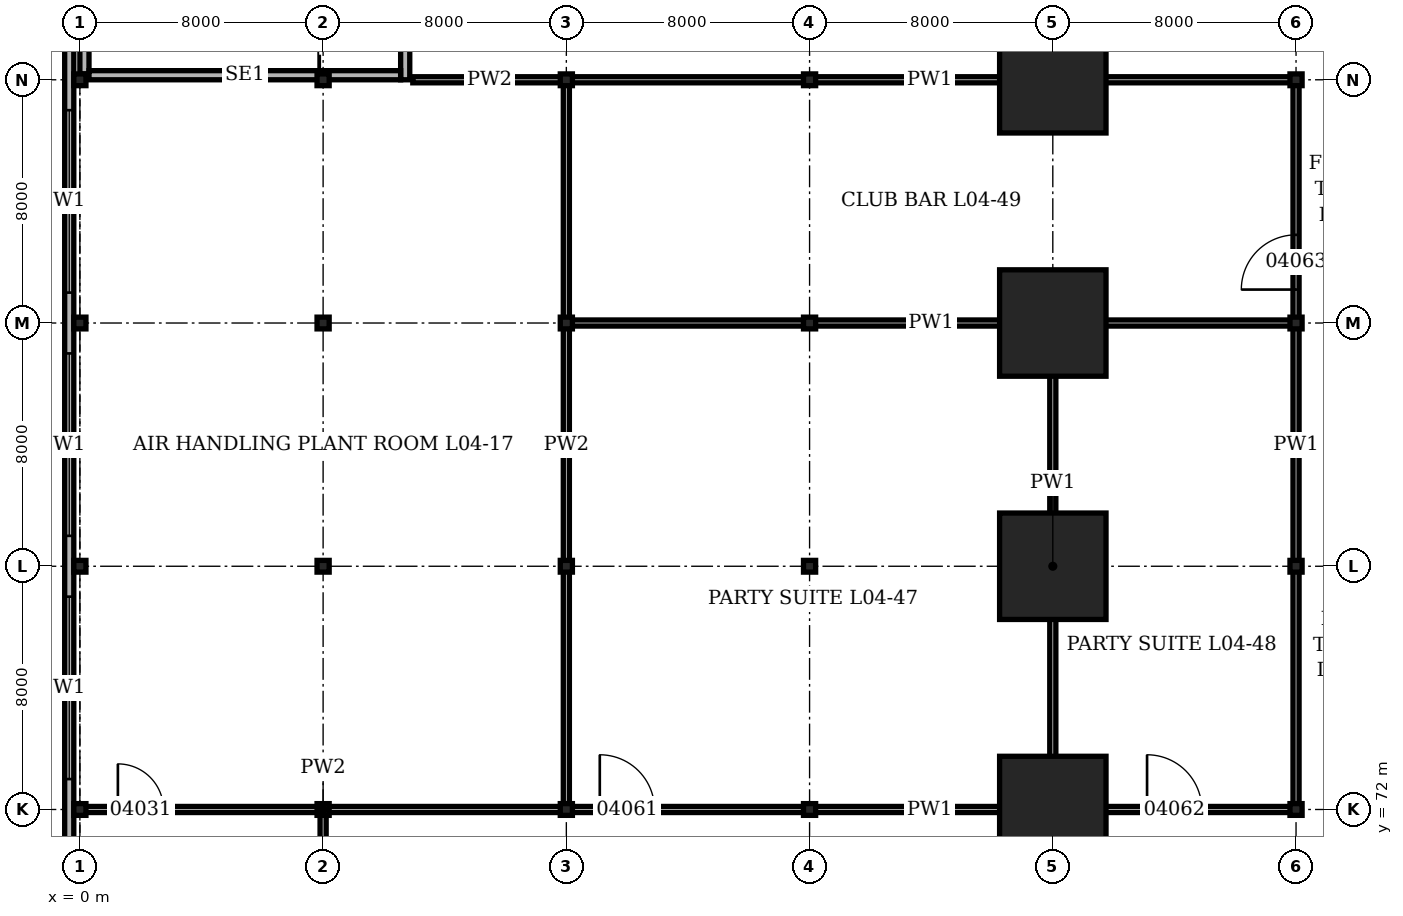
"""IFC4 building model, lengths in metres.
Left out: names, types, materials, properties, quantities, classifications, styles, units other than length and angle.
Written with IfcOpenShell. Run it as: python <this file> out.ifc"""

import sys

from ifc_helpers import new_model, si_unit, direction, frame, frame_2d, origin, origin_2d, place, context, subcontext, project, spatial, rectangle, hollow_rectangle, i_section, extrude, element, fill, save


model = new_model("IFC4")
c1 = context("Model", 3, precision=1e-05, world=origin(), true_north=direction((0.0, 1.0)))
c2 = subcontext(c1, "Body", "Model", "MODEL_VIEW")
j1 = project(units=[si_unit("LENGTHUNIT", "METRE"), si_unit("PLANEANGLEUNIT", "RADIAN")], contexts=[c1])
p1 = place(None, origin())
s1 = spatial("IfcSite", under=j1, at=p1, CompositionType="ELEMENT")
p2 = place(p1, origin())
s2 = spatial("IfcBuilding", under=s1, at=p2, CompositionType="ELEMENT")
p3 = place(p2, frame((0.0, 0.0, 19.9)))
s3 = spatial("IfcBuildingStorey", under=s2, at=p3, CompositionType="ELEMENT", Elevation=19.9)
for number, where, z_axis, x_axis in (
    (1, (0.0, 72.0, 0.0), (0.0, 0.0, 1.0), (1.0, 0.0, 0.0)),
    (2, (0.0, 80.0, 0.0), (0.0, 0.0, 1.0), (1.0, 0.0, 0.0)),
    (3, (0.0, 88.0, 0.0), (0.0, 0.0, 1.0), (1.0, 0.0, 0.0)),
    (4, (0.0, 96.0, 0.0), (0.0, 0.0, 1.0), (1.0, 0.0, 0.0)),
    (5, (8.0, 72.0, 0.0), (0.0, 0.0, 1.0), (1.0, 0.0, 0.0)),
    (6, (8.0, 80.0, 0.0), (0.0, 0.0, 1.0), (1.0, 0.0, 0.0)),
    (7, (8.0, 88.0, 0.0), (0.0, 0.0, 1.0), (1.0, 0.0, 0.0)),
    (8, (8.0, 96.0, 0.0), (0.0, 0.0, 1.0), (1.0, 0.0, 0.0)),
    (9, (16.0, 72.0, 0.0), (0.0, 0.0, 1.0), (1.0, 0.0, 0.0)),
    (10, (16.0, 80.0, 0.0), (0.0, 0.0, 1.0), (1.0, 0.0, 0.0)),
    (11, (16.0, 88.0, 0.0), (0.0, 0.0, 1.0), (1.0, 0.0, 0.0)),
    (12, (16.0, 96.0, 0.0), (0.0, 0.0, 1.0), (1.0, 0.0, 0.0)),
    (13, (24.0, 72.0, 0.0), (0.0, 0.0, 1.0), (1.0, 0.0, 0.0)),
    (14, (24.0, 80.0, 0.0), (0.0, 0.0, 1.0), (1.0, 0.0, 0.0)),
    (15, (24.0, 88.0, 0.0), (0.0, 0.0, 1.0), (1.0, 0.0, 0.0)),
    (16, (24.0, 96.0, 0.0), (0.0, 0.0, 1.0), (1.0, 0.0, 0.0)),
):
    element("IfcColumn", number, at=place(p3, frame(where, z_axis=z_axis, x_axis=x_axis)), inside=s3, PredefinedType="COLUMN", context=c2, shape_type="SweptSolid", body=[
        extrude(i_section(OverallWidth=0.399, OverallDepth=0.386, WebThickness=0.021, FlangeThickness=0.033, at=origin_2d()), origin(), (0.0, 0.0, 1.0), 6.0),
    ])
for number, where, z_axis, x_axis in (
    (17, (32.0, 72.0, 0.0), (0.0, 0.0, 1.0), (1.0, 0.0, 0.0)),
    (18, (32.0, 80.0, 0.0), (0.0, 0.0, 1.0), (1.0, 0.0, 0.0)),
    (19, (32.0, 88.0, 0.0), (0.0, 0.0, 1.0), (1.0, 0.0, 0.0)),
    (20, (32.0, 96.0, 0.0), (0.0, 0.0, 1.0), (1.0, 0.0, 0.0)),
):
    element("IfcColumn", number, at=place(p3, frame(where, z_axis=z_axis, x_axis=x_axis)), inside=s3, PredefinedType="COLUMN", context=c2, shape_type="SweptSolid", body=[
        extrude(hollow_rectangle(XDim=3.5, YDim=3.5, WallThickness=0.5, at=origin_2d()), origin(), (0.0, 0.0, 1.0), 6.0),
    ])
for number, where, z_axis, x_axis in (
    (21, (40.0, 72.0, 0.0), (0.0, 0.0, 1.0), (1.0, 0.0, 0.0)),
    (22, (40.0, 80.0, 0.0), (0.0, 0.0, 1.0), (1.0, 0.0, 0.0)),
    (23, (40.0, 88.0, 0.0), (0.0, 0.0, 1.0), (1.0, 0.0, 0.0)),
    (24, (40.0, 96.0, 0.0), (0.0, 0.0, 1.0), (1.0, 0.0, 0.0)),
):
    element("IfcColumn", number, at=place(p3, frame(where, z_axis=z_axis, x_axis=x_axis)), inside=s3, PredefinedType="COLUMN", context=c2, shape_type="SweptSolid", body=[
        extrude(i_section(OverallWidth=0.399, OverallDepth=0.386, WebThickness=0.021, FlangeThickness=0.033, at=origin_2d()), origin(), (0.0, 0.0, 1.0), 6.0),
    ])
p4 = place(p3, frame((-0.35, 112.35, 0.0), z_axis=(0.0, 0.0, 1.0), x_axis=(0.0, -1.0, 0.0)))
e25 = element("IfcWall", 25, at=p4, inside=s3, PredefinedType="SOLIDWALL", context=c2, shape_type="SweptSolid", body=[
    extrude(rectangle(XDim=112.7, YDim=0.3, at=frame_2d((56.35, 0.0))), origin(), (0.0, 0.0, 1.0), 6.0),
])
p5 = place(p4, frame((1.35, 0.0, 1.0)))
e26 = element("IfcOpeningElement", 26, at=p5, cuts=e25, PredefinedType="OPENING", context=c2, shape_type="SweptSolid", body=[
    extrude(rectangle(XDim=6.0, YDim=1.5, at=frame_2d((3.0, 0.75))), frame((0.0, 0.16, 0.0), z_axis=(0.0, -1.0, 0.0), x_axis=(1.0, 0.0, 0.0)), (0.0, 0.0, 1.0), 0.32),
])
p6 = place(p4, frame((9.35, 0.0, 1.0)))
e27 = element("IfcOpeningElement", 27, at=p6, cuts=e25, PredefinedType="OPENING", context=c2, shape_type="SweptSolid", body=[
    extrude(rectangle(XDim=6.0, YDim=1.5, at=frame_2d((3.0, 0.75))), frame((0.0, 0.16, 0.0), z_axis=(0.0, -1.0, 0.0), x_axis=(1.0, 0.0, 0.0)), (0.0, 0.0, 1.0), 0.32),
])
p7 = place(p4, frame((17.35, 0.0, 1.0)))
e28 = element("IfcOpeningElement", 28, at=p7, cuts=e25, PredefinedType="OPENING", context=c2, shape_type="SweptSolid", body=[
    extrude(rectangle(XDim=6.0, YDim=1.5, at=frame_2d((3.0, 0.75))), frame((0.0, 0.16, 0.0), z_axis=(0.0, -1.0, 0.0), x_axis=(1.0, 0.0, 0.0)), (0.0, 0.0, 1.0), 0.32),
])
p8 = place(p4, frame((25.35, 0.0, 1.0)))
e29 = element("IfcOpeningElement", 29, at=p8, cuts=e25, PredefinedType="OPENING", context=c2, shape_type="SweptSolid", body=[
    extrude(rectangle(XDim=6.0, YDim=1.5, at=frame_2d((3.0, 0.75))), frame((0.0, 0.16, 0.0), z_axis=(0.0, -1.0, 0.0), x_axis=(1.0, 0.0, 0.0)), (0.0, 0.0, 1.0), 0.32),
])
p9 = place(p4, frame((33.35, 0.0, 1.0)))
e30 = element("IfcOpeningElement", 30, at=p9, cuts=e25, PredefinedType="OPENING", context=c2, shape_type="SweptSolid", body=[
    extrude(rectangle(XDim=6.0, YDim=1.5, at=frame_2d((3.0, 0.75))), frame((0.0, 0.16, 0.0), z_axis=(0.0, -1.0, 0.0), x_axis=(1.0, 0.0, 0.0)), (0.0, 0.0, 1.0), 0.32),
])
p10 = place(p4, frame((41.35, 0.0, 1.0)))
e31 = element("IfcOpeningElement", 31, at=p10, cuts=e25, PredefinedType="OPENING", context=c2, shape_type="SweptSolid", body=[
    extrude(rectangle(XDim=6.0, YDim=1.5, at=frame_2d((3.0, 0.75))), frame((0.0, 0.16, 0.0), z_axis=(0.0, -1.0, 0.0), x_axis=(1.0, 0.0, 0.0)), (0.0, 0.0, 1.0), 0.32),
])
p11 = place(p4, frame((49.35, 0.0, 1.0)))
e32 = element("IfcOpeningElement", 32, at=p11, cuts=e25, PredefinedType="OPENING", context=c2, shape_type="SweptSolid", body=[
    extrude(rectangle(XDim=6.0, YDim=1.5, at=frame_2d((3.0, 0.75))), frame((0.0, 0.16, 0.0), z_axis=(0.0, -1.0, 0.0), x_axis=(1.0, 0.0, 0.0)), (0.0, 0.0, 1.0), 0.32),
])
p12 = place(p4, frame((57.35, 0.0, 1.0)))
e33 = element("IfcOpeningElement", 33, at=p12, cuts=e25, PredefinedType="OPENING", context=c2, shape_type="SweptSolid", body=[
    extrude(rectangle(XDim=6.0, YDim=1.5, at=frame_2d((3.0, 0.75))), frame((0.0, 0.16, 0.0), z_axis=(0.0, -1.0, 0.0), x_axis=(1.0, 0.0, 0.0)), (0.0, 0.0, 1.0), 0.32),
])
p13 = place(p4, frame((65.35, 0.0, 1.0)))
e34 = element("IfcOpeningElement", 34, at=p13, cuts=e25, PredefinedType="OPENING", context=c2, shape_type="SweptSolid", body=[
    extrude(rectangle(XDim=6.0, YDim=1.5, at=frame_2d((3.0, 0.75))), frame((0.0, 0.16, 0.0), z_axis=(0.0, -1.0, 0.0), x_axis=(1.0, 0.0, 0.0)), (0.0, 0.0, 1.0), 0.32),
])
p14 = place(p4, frame((73.35, 0.0, 1.0)))
e35 = element("IfcOpeningElement", 35, at=p14, cuts=e25, PredefinedType="OPENING", context=c2, shape_type="SweptSolid", body=[
    extrude(rectangle(XDim=6.0, YDim=1.5, at=frame_2d((3.0, 0.75))), frame((0.0, 0.16, 0.0), z_axis=(0.0, -1.0, 0.0), x_axis=(1.0, 0.0, 0.0)), (0.0, 0.0, 1.0), 0.32),
])
p15 = place(p4, frame((81.35, 0.0, 1.0)))
e36 = element("IfcOpeningElement", 36, at=p15, cuts=e25, PredefinedType="OPENING", context=c2, shape_type="SweptSolid", body=[
    extrude(rectangle(XDim=6.0, YDim=1.5, at=frame_2d((3.0, 0.75))), frame((0.0, 0.16, 0.0), z_axis=(0.0, -1.0, 0.0), x_axis=(1.0, 0.0, 0.0)), (0.0, 0.0, 1.0), 0.32),
])
p16 = place(p4, frame((89.35, 0.0, 1.0)))
e37 = element("IfcOpeningElement", 37, at=p16, cuts=e25, PredefinedType="OPENING", context=c2, shape_type="SweptSolid", body=[
    extrude(rectangle(XDim=6.0, YDim=1.5, at=frame_2d((3.0, 0.75))), frame((0.0, 0.16, 0.0), z_axis=(0.0, -1.0, 0.0), x_axis=(1.0, 0.0, 0.0)), (0.0, 0.0, 1.0), 0.32),
])
p17 = place(p4, frame((97.35, 0.0, 1.0)))
e38 = element("IfcOpeningElement", 38, at=p17, cuts=e25, PredefinedType="OPENING", context=c2, shape_type="SweptSolid", body=[
    extrude(rectangle(XDim=6.0, YDim=1.5, at=frame_2d((3.0, 0.75))), frame((0.0, 0.16, 0.0), z_axis=(0.0, -1.0, 0.0), x_axis=(1.0, 0.0, 0.0)), (0.0, 0.0, 1.0), 0.32),
])
p18 = place(p4, frame((105.35, 0.0, 1.0)))
e39 = element("IfcOpeningElement", 39, at=p18, cuts=e25, PredefinedType="OPENING", context=c2, shape_type="SweptSolid", body=[
    extrude(rectangle(XDim=6.0, YDim=1.5, at=frame_2d((3.0, 0.75))), frame((0.0, 0.16, 0.0), z_axis=(0.0, -1.0, 0.0), x_axis=(1.0, 0.0, 0.0)), (0.0, 0.0, 1.0), 0.32),
])
p19 = place(p3, frame((0.15, 96.193, 0.0), z_axis=(0.0, 0.0, 1.0), x_axis=(0.0, 1.0, 0.0)))
e40 = element("IfcWall", 40, at=p19, inside=s3, PredefinedType="SOLIDWALL", context=c2, shape_type="SweptSolid", body=[
    extrude(rectangle(XDim=7.614, YDim=0.3, at=frame_2d((3.807, 0.0))), origin(), (0.0, 0.0, 1.0), 5.75),
])
p20 = place(p3, frame((10.7, 96.0, 0.0), z_axis=(0.0, 0.0, 1.0), x_axis=(0.0, 1.0, 0.0)))
e41 = element("IfcWall", 41, at=p20, inside=s3, PredefinedType="SOLIDWALL", context=c2, shape_type="SweptSolid", body=[
    extrude(rectangle(XDim=8.0, YDim=0.3, at=frame_2d((4.0, 0.0))), origin(), (0.0, 0.0, 1.0), 5.75),
])
p21 = place(p20, frame((1.1, 0.0, 0.0)))
e42 = element("IfcOpeningElement", 42, at=p21, cuts=e41, PredefinedType="OPENING", context=c2, shape_type="SweptSolid", body=[
    extrude(rectangle(XDim=1.8, YDim=2.1, at=frame_2d((0.9, 1.05))), frame((0.0, 0.16, 0.0), z_axis=(0.0, -1.0, 0.0), x_axis=(1.0, 0.0, 0.0)), (0.0, 0.0, 1.0), 0.32),
])
p22 = place(p3, frame((0.3, 96.15, 0.0), z_axis=(0.0, 0.0, 1.0), x_axis=(1.0, 0.0, 0.0)))
e43 = element("IfcWall", 43, at=p22, inside=s3, PredefinedType="SOLIDWALL", context=c2, shape_type="SweptSolid", body=[
    extrude(rectangle(XDim=10.25, YDim=0.3, at=frame_2d((5.125, 0.0))), origin(), (0.0, 0.0, 1.0), 5.75),
])
p23 = place(p3, frame((0.0, 72.0, 0.0), z_axis=(0.0, 0.0, 1.0), x_axis=(1.0, 0.0, 0.0)))
e44 = element("IfcWall", 44, at=p23, inside=s3, PredefinedType="PARTITIONING", context=c2, shape_type="SweptSolid", body=[
    extrude(rectangle(XDim=16.0, YDim=0.2, at=frame_2d((8.0, 0.0))), origin(), (0.0, 0.0, 1.0), 4.978),
])
p24 = place(p23, frame((1.25, 0.0, 0.0)))
e45 = element("IfcOpeningElement", 45, at=p24, cuts=e44, PredefinedType="OPENING", context=c2, shape_type="SweptSolid", body=[
    extrude(rectangle(XDim=1.5, YDim=2.4, at=frame_2d((0.75, 1.2))), frame((0.0, 0.11, 0.0), z_axis=(0.0, -1.0, 0.0), x_axis=(1.0, 0.0, 0.0)), (0.0, 0.0, 1.0), 0.22),
])
p25 = place(p3, frame((16.0, 72.0, 0.0), z_axis=(0.0, 0.0, 1.0), x_axis=(1.0, 0.0, 0.0)))
e46 = element("IfcWall", 46, at=p25, inside=s3, PredefinedType="PARTITIONING", context=c2, shape_type="SweptSolid", body=[
    extrude(rectangle(XDim=23.9, YDim=0.2, at=frame_2d((11.95, 0.0))), origin(), (0.0, 0.0, 1.0), 4.978),
])
p26 = place(p25, frame((1.1, 0.0, 0.0)))
e47 = element("IfcOpeningElement", 47, at=p26, cuts=e46, PredefinedType="OPENING", context=c2, shape_type="SweptSolid", body=[
    extrude(rectangle(XDim=1.8, YDim=2.4, at=frame_2d((0.9, 1.2))), frame((0.0, 0.11, 0.0), z_axis=(0.0, -1.0, 0.0), x_axis=(1.0, 0.0, 0.0)), (0.0, 0.0, 1.0), 0.22),
])
p27 = place(p25, frame((19.1, 0.0, 0.0)))
e48 = element("IfcOpeningElement", 48, at=p27, cuts=e46, PredefinedType="OPENING", context=c2, shape_type="SweptSolid", body=[
    extrude(rectangle(XDim=1.8, YDim=2.4, at=frame_2d((0.9, 1.2))), frame((0.0, 0.11, 0.0), z_axis=(0.0, -1.0, 0.0), x_axis=(1.0, 0.0, 0.0)), (0.0, 0.0, 1.0), 0.22),
])
p28 = place(p3, frame((16.1, 88.0, 0.0), z_axis=(0.0, 0.0, 1.0), x_axis=(1.0, 0.0, 0.0)))
e49 = element("IfcWall", 49, at=p28, inside=s3, PredefinedType="PARTITIONING", context=c2, shape_type="SweptSolid", body=[
    extrude(rectangle(XDim=23.8, YDim=0.2, at=frame_2d((11.9, 0.0))), origin(), (0.0, 0.0, 1.0), 4.978),
])
p29 = place(p3, frame((10.95, 96.0, 0.0), z_axis=(0.0, 0.0, 1.0), x_axis=(1.0, 0.0, 0.0)))
e50 = element("IfcWall", 50, at=p29, inside=s3, PredefinedType="PARTITIONING", context=c2, shape_type="SweptSolid", body=[
    extrude(rectangle(XDim=5.05, YDim=0.2, at=frame_2d((2.525, 0.0))), origin(), (0.0, 0.0, 1.0), 4.978),
])
p30 = place(p3, frame((16.0, 96.0, 0.0), z_axis=(0.0, 0.0, 1.0), x_axis=(1.0, 0.0, 0.0)))
e51 = element("IfcWall", 51, at=p30, inside=s3, PredefinedType="PARTITIONING", context=c2, shape_type="SweptSolid", body=[
    extrude(rectangle(XDim=23.9, YDim=0.2, at=frame_2d((11.95, 0.0))), origin(), (0.0, 0.0, 1.0), 4.978),
])
p31 = place(p3, frame((8.0, 64.1, 0.0), z_axis=(0.0, 0.0, 1.0), x_axis=(0.0, 1.0, 0.0)))
e52 = element("IfcWall", 52, at=p31, inside=s3, PredefinedType="PARTITIONING", context=c2, shape_type="SweptSolid", body=[
    extrude(rectangle(XDim=7.8, YDim=0.2, at=frame_2d((3.9, 0.0))), origin(), (0.0, 0.0, 1.0), 4.978),
])
p32 = place(p31, frame((1.0, 0.0, 0.0)))
e53 = element("IfcOpeningElement", 53, at=p32, cuts=e52, PredefinedType="OPENING", context=c2, shape_type="SweptSolid", body=[
    extrude(rectangle(XDim=1.8, YDim=2.4, at=frame_2d((0.9, 1.2))), frame((0.0, 0.11, 0.0), z_axis=(0.0, -1.0, 0.0), x_axis=(1.0, 0.0, 0.0)), (0.0, 0.0, 1.0), 0.22),
])
p33 = place(p3, frame((16.0, 72.1, 0.0), z_axis=(0.0, 0.0, 1.0), x_axis=(0.0, 1.0, 0.0)))
e54 = element("IfcWall", 54, at=p33, inside=s3, PredefinedType="PARTITIONING", context=c2, shape_type="SweptSolid", body=[
    extrude(rectangle(XDim=23.8, YDim=0.2, at=frame_2d((11.9, 0.0))), origin(), (0.0, 0.0, 1.0), 4.978),
])
p34 = place(p3, frame((32.0, 72.1, 0.0), z_axis=(0.0, 0.0, 1.0), x_axis=(0.0, 1.0, 0.0)))
e55 = element("IfcWall", 55, at=p34, inside=s3, PredefinedType="PARTITIONING", context=c2, shape_type="SweptSolid", body=[
    extrude(rectangle(XDim=15.8, YDim=0.2, at=frame_2d((7.9, 0.0))), origin(), (0.0, 0.0, 1.0), 4.978),
])
p35 = place(p3, frame((40.0, 72.1, 0.0), z_axis=(0.0, 0.0, 1.0), x_axis=(0.0, 1.0, 0.0)))
e56 = element("IfcWall", 56, at=p35, inside=s3, PredefinedType="PARTITIONING", context=c2, shape_type="SweptSolid", body=[
    extrude(rectangle(XDim=23.8, YDim=0.2, at=frame_2d((11.9, 0.0))), origin(), (0.0, 0.0, 1.0), 4.978),
])
p36 = place(p35, frame((17.0, 0.0, 0.0)))
e57 = element("IfcOpeningElement", 57, at=p36, cuts=e56, PredefinedType="OPENING", context=c2, shape_type="SweptSolid", body=[
    extrude(rectangle(XDim=1.8, YDim=2.4, at=frame_2d((0.9, 1.2))), frame((0.0, 0.11, 0.0), z_axis=(0.0, -1.0, 0.0), x_axis=(1.0, 0.0, 0.0)), (0.0, 0.0, 1.0), 0.22),
])
p37 = place(p7, origin())
e58 = element("IfcWindow", 58, at=p37, inside=s3, PartitioningType="SINGLE_PANEL", PredefinedType="WINDOW", context=c2, shape_type="SweptSolid", body=[
    extrude(rectangle(XDim=6.0, YDim=1.5, at=frame_2d((3.0, 0.75))), frame((0.0, 0.03, 0.0), z_axis=(0.0, -1.0, 0.0), x_axis=(1.0, 0.0, 0.0)), (0.0, 0.0, 1.0), 0.06),
])
fill(e28, e58)
p38 = place(p8, origin())
e59 = element("IfcWindow", 59, at=p38, inside=s3, PartitioningType="SINGLE_PANEL", PredefinedType="WINDOW", context=c2, shape_type="SweptSolid", body=[
    extrude(rectangle(XDim=6.0, YDim=1.5, at=frame_2d((3.0, 0.75))), frame((0.0, 0.03, 0.0), z_axis=(0.0, -1.0, 0.0), x_axis=(1.0, 0.0, 0.0)), (0.0, 0.0, 1.0), 0.06),
])
fill(e29, e59)
p39 = place(p9, origin())
e60 = element("IfcWindow", 60, at=p39, inside=s3, PartitioningType="SINGLE_PANEL", PredefinedType="WINDOW", context=c2, shape_type="SweptSolid", body=[
    extrude(rectangle(XDim=6.0, YDim=1.5, at=frame_2d((3.0, 0.75))), frame((0.0, 0.03, 0.0), z_axis=(0.0, -1.0, 0.0), x_axis=(1.0, 0.0, 0.0)), (0.0, 0.0, 1.0), 0.06),
])
fill(e30, e60)
p40 = place(p24, origin())
e61 = element("IfcDoor", 61, at=p40, inside=s3, OperationType="DOUBLE_DOOR_SINGLE_SWING", PredefinedType="DOOR", context=c2, shape_type="SweptSolid", body=[
    extrude(rectangle(XDim=1.5, YDim=2.4, at=frame_2d((0.75, 1.2))), frame((0.0, 0.1, 0.0), z_axis=(0.0, -1.0, 0.0), x_axis=(1.0, 0.0, 0.0)), (0.0, 0.0, 1.0), 0.199),
])
fill(e45, e61)
p41 = place(p26, origin())
e62 = element("IfcDoor", 62, at=p41, inside=s3, OperationType="DOUBLE_DOOR_DOUBLE_SWING", PredefinedType="DOOR", context=c2, shape_type="SweptSolid", body=[
    extrude(rectangle(XDim=1.8, YDim=2.4, at=frame_2d((0.9, 1.2))), frame((0.0, 0.1, 0.0), z_axis=(0.0, -1.0, 0.0), x_axis=(1.0, 0.0, 0.0)), (0.0, 0.0, 1.0), 0.199),
])
fill(e47, e62)
p42 = place(p27, origin())
e63 = element("IfcDoor", 63, at=p42, inside=s3, OperationType="DOUBLE_DOOR_DOUBLE_SWING", PredefinedType="DOOR", context=c2, shape_type="SweptSolid", body=[
    extrude(rectangle(XDim=1.8, YDim=2.4, at=frame_2d((0.9, 1.2))), frame((0.0, 0.1, 0.0), z_axis=(0.0, -1.0, 0.0), x_axis=(1.0, 0.0, 0.0)), (0.0, 0.0, 1.0), 0.199),
])
fill(e48, e63)
p43 = place(p36, origin())
e64 = element("IfcDoor", 64, at=p43, inside=s3, OperationType="DOUBLE_DOOR_DOUBLE_SWING", PredefinedType="DOOR", context=c2, shape_type="SweptSolid", body=[
    extrude(rectangle(XDim=1.8, YDim=2.4, at=frame_2d((0.9, 1.2))), frame((0.0, 0.1, 0.0), z_axis=(0.0, -1.0, 0.0), x_axis=(1.0, 0.0, 0.0)), (0.0, 0.0, 1.0), 0.199),
])
fill(e57, e64)
save(model, sys.argv[1])
